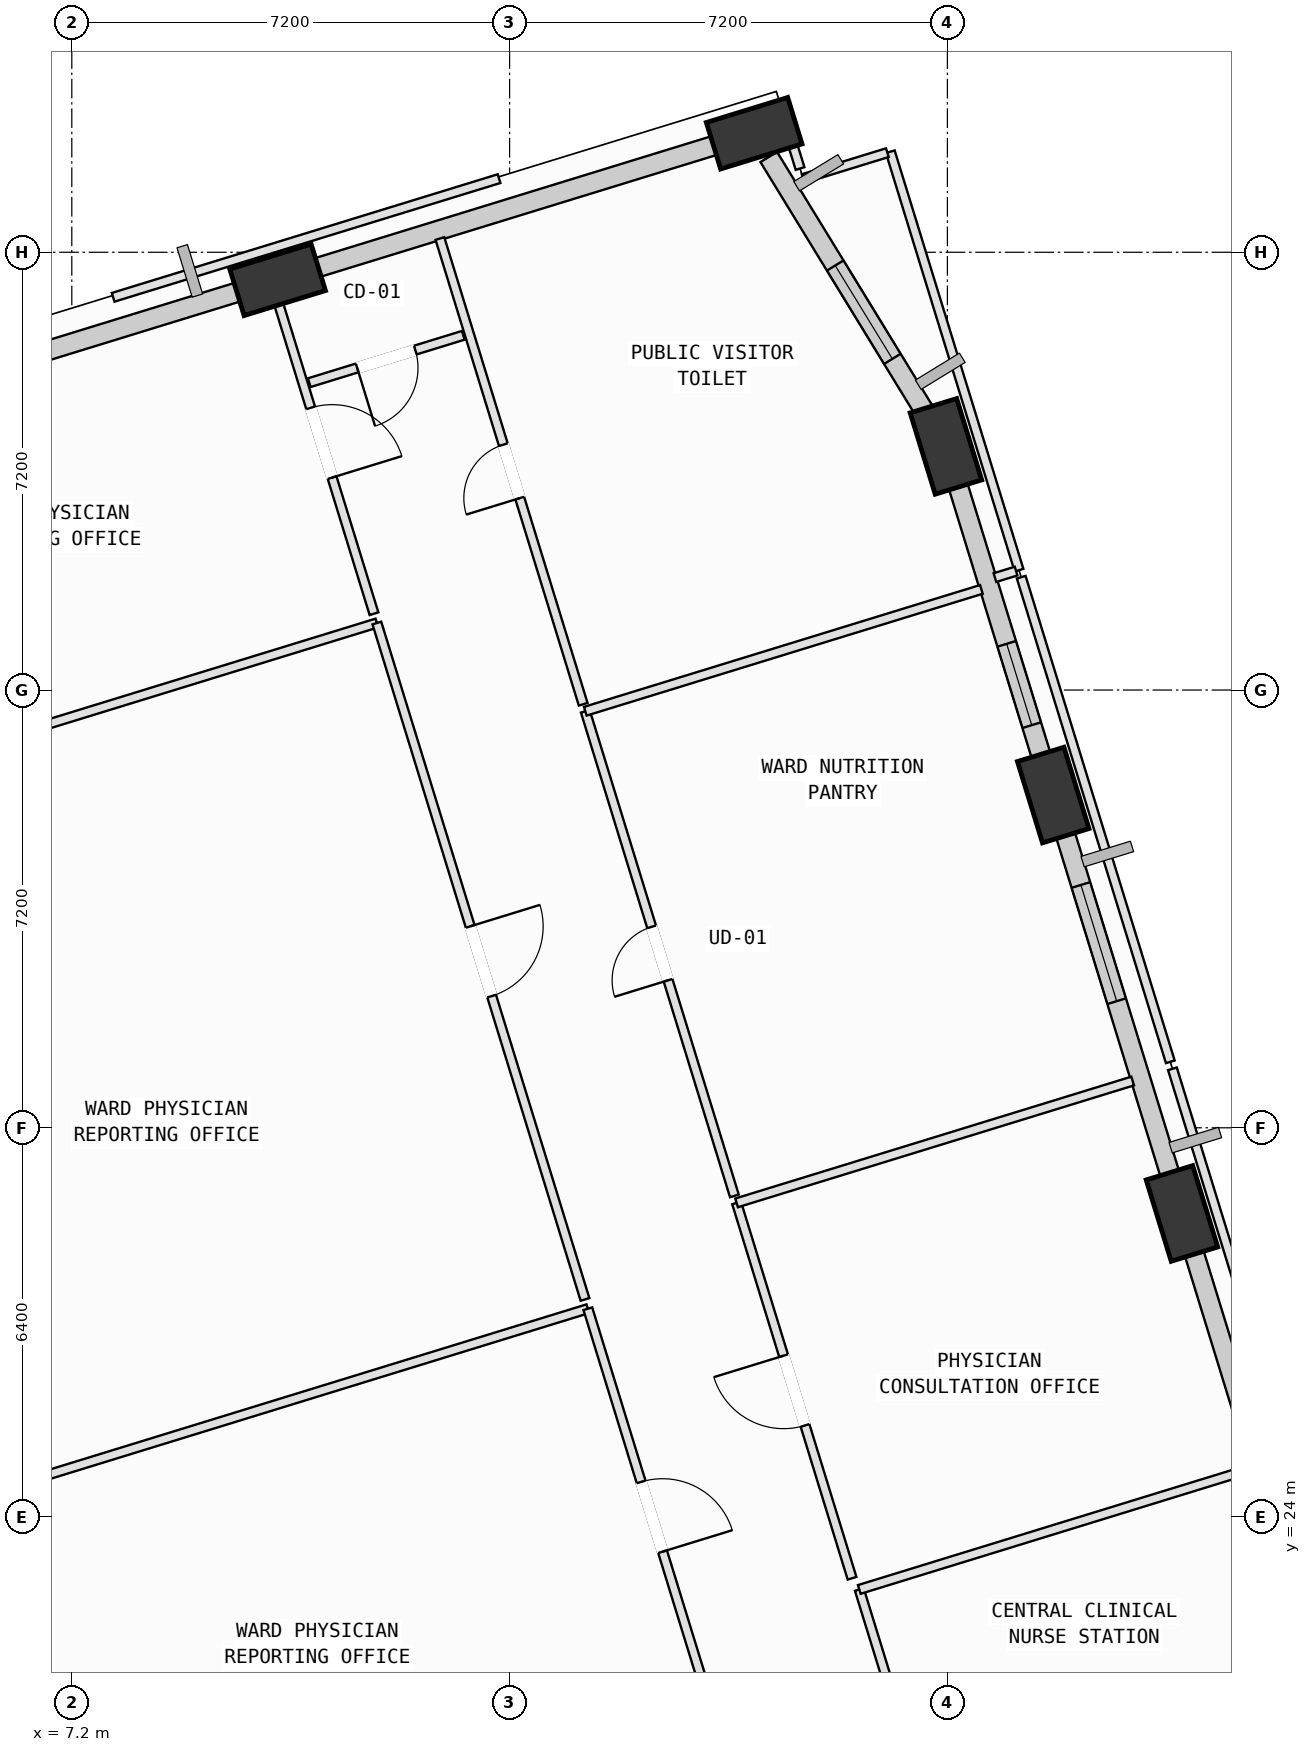
"""IFC4 building model, lengths in metres.
Left out: names, types, materials, properties, quantities, classifications, styles, units other than length and angle.
Written with IfcOpenShell. Run it as: python <this file> out.ifc"""

import sys

from ifc_helpers import new_model, si_unit, direction, frame, frame_2d, origin, origin_2d, place, context, subcontext, project, spatial, rectangle, extrude, element, fill, save


model = new_model("IFC4")
c1 = context("Model", 3, precision=1e-05, world=origin(), true_north=direction((0.0, 1.0)))
c2 = subcontext(c1, "Body", "Model", "MODEL_VIEW")
j1 = project(units=[si_unit("LENGTHUNIT", "METRE"), si_unit("PLANEANGLEUNIT", "RADIAN")], contexts=[c1])
p1 = place(None, origin())
s1 = spatial("IfcSite", under=j1, at=p1, CompositionType="ELEMENT")
p2 = place(p1, origin())
s2 = spatial("IfcBuilding", under=s1, at=p2, CompositionType="ELEMENT")
p3 = place(p2, frame((0.0, 0.0, 96.4)))
s3 = spatial("IfcBuildingStorey", under=s2, at=p3, CompositionType="ELEMENT", Elevation=96.4)
p4 = place(p3, frame((25.458, 28.991, 0.002), z_axis=(-0.017093218306, -0.033820153363, 0.999281751617), x_axis=(0.168398647055, 0.985053333216, 0.036219143978)))
e1 = element("IfcColumn", 1, at=p4, inside=s3, PredefinedType="COLUMN", context=c2, shape_type="SweptSolid", body=[
    extrude(rectangle(XDim=1.4, YDim=0.8, at=origin_2d()), origin(), (0.0, 0.0, 1.0), 3.999),
])
p5 = place(p3, frame((23.341, 35.873, 0.002), z_axis=(-0.045484855121, -0.042863073928, 0.998045031473), x_axis=(0.492578807778, 0.86821525244, 0.059736032321)))
e2 = element("IfcColumn", 2, at=p5, inside=s3, PredefinedType="COLUMN", context=c2, shape_type="SweptSolid", body=[
    extrude(rectangle(XDim=1.4, YDim=0.8, at=origin_2d()), origin(), (0.0, 0.0, 1.0), 4.004),
])
p6 = place(p3, frame((21.576, 41.607, 0.002), z_axis=(-0.068963873913, -0.050216413043, 0.996354503154), x_axis=(0.596759663559, 0.798266514459, 0.081538186404)))
e3 = element("IfcColumn", 3, at=p6, inside=s3, PredefinedType="COLUMN", context=c2, shape_type="SweptSolid", body=[
    extrude(rectangle(XDim=1.4, YDim=0.8, at=origin_2d()), origin(), (0.0, 0.0, 1.0), 4.011),
])
p7 = place(p3, frame((18.422, 46.758, 0.002), z_axis=(-0.089927303645, -0.063270932072, 0.993936551906), x_axis=(0.789011269168, -0.61352743043, 0.032331242417)))
e4 = element("IfcColumn", 4, at=p7, inside=s3, PredefinedType="COLUMN", context=c2, shape_type="SweptSolid", body=[
    extrude(rectangle(XDim=1.4, YDim=0.8, at=origin_2d()), origin(), (0.0, 0.0, 1.0), 4.021),
])
p8 = place(p3, frame((10.585, 44.347, 0.002), z_axis=(-0.079651712369, -0.095351707425, 0.992251811088), x_axis=(0.920581175981, -0.388838882589, 0.036532476201)))
e5 = element("IfcColumn", 5, at=p8, inside=s3, PredefinedType="COLUMN", context=c2, shape_type="SweptSolid", body=[
    extrude(rectangle(XDim=1.4, YDim=0.8, at=origin_2d()), origin(), (0.0, 0.0, 1.0), 4.028),
])
p9 = place(p3, frame((25.619, 28.467, 0.0), z_axis=(0.0, 0.0, 1.0), x_axis=(0.294050319043, -0.955789940244, 0.0)))
e6 = element("IfcWall", 6, at=p9, inside=s3, PredefinedType="SOLIDWALL", context=c2, shape_type="SweptSolid", body=[
    extrude(rectangle(XDim=6.76, YDim=0.32, at=frame_2d((3.38, 0.0))), origin(), (0.0, 0.0, 1.0), 2.965),
])
p10 = place(p3, frame((23.499, 35.358, 0.0), z_axis=(0.0, 0.0, 1.0), x_axis=(0.294025193447, -0.955797669812, 0.0)))
e7 = element("IfcWall", 7, at=p10, inside=s3, PredefinedType="SOLIDWALL", context=c2, shape_type="SweptSolid", body=[
    extrude(rectangle(XDim=6.223, YDim=0.32, at=frame_2d((3.111, 0.0))), origin(), (0.0, 0.0, 1.0), 3.165),
])
p11 = place(p10, frame((1.009, 0.0, 0.75)))
e8 = element("IfcOpeningElement", 8, at=p11, cuts=e7, PredefinedType="OPENING", context=c2, shape_type="SweptSolid", body=[
    extrude(rectangle(XDim=2.0, YDim=1.95, at=frame_2d((1.0, 0.975))), frame((0.0, 0.17, 0.0), z_axis=(0.0, -1.0, 0.0), x_axis=(1.0, 0.0, 0.0)), (0.0, 0.0, 1.0), 0.34),
])
p12 = place(p3, frame((21.731, 41.106, 0.0), z_axis=(0.0, 0.0, 1.0), x_axis=(0.293997472896, -0.955806196847, 0.0)))
e9 = element("IfcWall", 9, at=p12, inside=s3, PredefinedType="SOLIDWALL", context=c2, shape_type="SweptSolid", body=[
    extrude(rectangle(XDim=5.047, YDim=0.32, at=frame_2d((2.524, 0.0))), origin(), (0.0, 0.0, 1.0), 3.165),
])
p13 = place(p12, frame((2.873, 0.0, 0.75)))
e10 = element("IfcOpeningElement", 10, at=p13, cuts=e9, PredefinedType="OPENING", context=c2, shape_type="SweptSolid", body=[
    extrude(rectangle(XDim=1.4, YDim=1.85, at=frame_2d((0.7, 0.925))), frame((0.0, 0.17, 0.0), z_axis=(0.0, -1.0, 0.0), x_axis=(1.0, 0.0, 0.0)), (0.0, 0.0, 1.0), 0.34),
])
p14 = place(p3, frame((18.662, 46.367, 0.0), z_axis=(0.0, 0.0, 1.0), x_axis=(0.522196965962, -0.852824910952, 0.0)))
e11 = element("IfcWall", 11, at=p14, inside=s3, PredefinedType="SOLIDWALL", context=c2, shape_type="SweptSolid", body=[
    extrude(rectangle(XDim=5.128, YDim=0.32, at=frame_2d((2.564, 0.0))), origin(), (0.0, 0.0, 1.0), 3.165),
])
p15 = place(p14, frame((2.093, 0.0, 0.75)))
e12 = element("IfcOpeningElement", 12, at=p15, cuts=e11, PredefinedType="OPENING", context=c2, shape_type="SweptSolid", body=[
    extrude(rectangle(XDim=1.8, YDim=2.05, at=frame_2d((0.9, 1.025))), frame((0.0, 0.17, 0.0), z_axis=(0.0, -1.0, 0.0), x_axis=(1.0, 0.0, 0.0)), (0.0, 0.0, 1.0), 0.34),
])
p16 = place(p3, frame((10.841, 44.425, 0.0), z_axis=(0.0, 0.0, 1.0), x_axis=(0.95578995853, 0.294050259603, 0.0)))
e13 = element("IfcWall", 13, at=p16, inside=s3, PredefinedType="SOLIDWALL", context=c2, shape_type="SweptSolid", body=[
    extrude(rectangle(XDim=7.231, YDim=0.32, at=frame_2d((3.615, 0.0))), origin(), (0.0, 0.0, 1.0), 3.165),
])
p17 = place(p3, frame((2.98, 42.007, 0.0), z_axis=(0.0, 0.0, 1.0), x_axis=(0.955793529239, 0.294038653012, 0.0)))
e14 = element("IfcWall", 14, at=p17, inside=s3, PredefinedType="SOLIDWALL", context=c2, shape_type="SweptSolid", body=[
    extrude(rectangle(XDim=7.27, YDim=0.32, at=frame_2d((3.635, 0.0))), origin(), (0.0, 0.0, 1.0), 3.165),
])
p18 = place(p3, frame((5.206, 24.199, 0.0), z_axis=(0.0, 0.0, 1.0), x_axis=(0.955774194853, 0.294101493455, 0.0)))
e15 = element("IfcWall", 15, at=p18, inside=s3, PredefinedType="PARTITIONING", context=c2, shape_type="SweptSolid", body=[
    extrude(rectangle(XDim=10.966, YDim=0.15, at=frame_2d((5.483, 0.0))), origin(), (0.0, 0.0, 1.0), 3.78),
])
p19 = place(p3, frame((15.687, 27.424, 0.0), z_axis=(0.0, 0.0, 1.0), x_axis=(0.293975633895, -0.955812914056, 0.0)))
e16 = element("IfcWall", 16, at=p19, inside=s3, PredefinedType="PARTITIONING", context=c2, shape_type="SweptSolid", body=[
    extrude(rectangle(XDim=7.16, YDim=0.15, at=frame_2d((3.58, 0.0))), origin(), (0.0, 0.0, 1.0), 3.78),
])
p20 = place(p19, frame((2.98, 0.0, 0.0)))
e17 = element("IfcOpeningElement", 17, at=p20, cuts=e16, PredefinedType="OPENING", context=c2, shape_type="SweptSolid", body=[
    extrude(rectangle(XDim=1.2, YDim=2.15, at=frame_2d((0.6, 1.075))), frame((0.0, 0.085, 0.0), z_axis=(0.0, -1.0, 0.0), x_axis=(1.0, 0.0, 0.0)), (0.0, 0.0, 1.0), 0.17),
])
p21 = place(p3, frame((1.737, 35.478, 0.0), z_axis=(0.0, 0.0, 1.0), x_axis=(0.955797782575, 0.294024826886, 0.0)))
e18 = element("IfcWall", 18, at=p21, inside=s3, PredefinedType="PARTITIONING", context=c2, shape_type="SweptSolid", body=[
    extrude(rectangle(XDim=10.965, YDim=0.15, at=frame_2d((5.482, 0.0))), origin(), (0.0, 0.0, 1.0), 3.78),
])
p22 = place(p3, frame((12.217, 38.702, 0.0), z_axis=(0.0, 0.0, 1.0), x_axis=(0.294068161841, -0.955784450696, 0.0)))
e19 = element("IfcWall", 19, at=p22, inside=s3, PredefinedType="PARTITIONING", context=c2, shape_type="SweptSolid", body=[
    extrude(rectangle(XDim=11.64, YDim=0.15, at=frame_2d((5.82, 0.0))), origin(), (0.0, 0.0, 1.0), 3.78),
])
p23 = place(p22, frame((5.22, 0.0, 0.0)))
e20 = element("IfcOpeningElement", 20, at=p23, cuts=e19, PredefinedType="OPENING", context=c2, shape_type="SweptSolid", body=[
    extrude(rectangle(XDim=1.2, YDim=2.15, at=frame_2d((0.6, 1.075))), frame((0.0, 0.085, 0.0), z_axis=(0.0, -1.0, 0.0), x_axis=(1.0, 0.0, 0.0)), (0.0, 0.0, 1.0), 0.17),
])
p24 = place(p3, frame((9.878, 44.307, 0.0), z_axis=(0.0, 0.0, 1.0), x_axis=(0.955553962092, 0.294816257234, 0.0)))
e21 = element("IfcWall", 21, at=p24, inside=s3, PredefinedType="PARTITIONING", context=c2, shape_type="SweptSolid", body=[
    extrude(rectangle(XDim=0.587, YDim=0.15, at=frame_2d((0.293, 0.0))), origin(), (0.0, 0.0, 1.0), 3.78),
])
p25 = place(p3, frame((10.439, 44.48, 0.0), z_axis=(0.0, 0.0, 1.0), x_axis=(0.294114998969, -0.955770038964, 0.0)))
e22 = element("IfcWall", 22, at=p25, inside=s3, PredefinedType="PARTITIONING", context=c2, shape_type="SweptSolid", body=[
    extrude(rectangle(XDim=5.885, YDim=0.15, at=frame_2d((2.943, 0.0))), origin(), (0.0, 0.0, 1.0), 2.965),
])
p26 = place(p25, frame((2.343, 0.0, 0.0)))
e23 = element("IfcOpeningElement", 23, at=p26, cuts=e22, PredefinedType="OPENING", context=c2, shape_type="SweptSolid", body=[
    extrude(rectangle(XDim=1.2, YDim=2.15, at=frame_2d((0.6, 1.075))), frame((0.0, 0.085, 0.0), z_axis=(0.0, -1.0, 0.0), x_axis=(1.0, 0.0, 0.0)), (0.0, 0.0, 1.0), 0.17),
])
p27 = place(p3, frame((20.837, 20.58, 0.0), z_axis=(0.0, 0.0, 1.0), x_axis=(-0.294424516265, 0.955674737671, 0.0)))
e24 = element("IfcWall", 24, at=p27, inside=s3, PredefinedType="PARTITIONING", context=c2, shape_type="SweptSolid", body=[
    extrude(rectangle(XDim=2.33, YDim=0.15, at=frame_2d((1.165, 0.0))), origin(), (0.0, 0.0, 1.0), 3.78),
])
p28 = place(p3, frame((20.151, 22.807, 0.0), z_axis=(0.0, 0.0, 1.0), x_axis=(0.95576728766, 0.294123939589, 0.0)))
e25 = element("IfcWall", 25, at=p28, inside=s3, PredefinedType="PARTITIONING", context=c2, shape_type="SweptSolid", body=[
    extrude(rectangle(XDim=6.756, YDim=0.15, at=frame_2d((3.378, 0.0))), origin(), (0.0, 0.0, 1.0), 3.78),
])
p29 = place(p3, frame((20.032, 22.991, 0.0), z_axis=(0.0, 0.0, 1.0), x_axis=(-0.293974298693, 0.955813324718, 0.0)))
e26 = element("IfcWall", 26, at=p29, inside=s3, PredefinedType="PARTITIONING", context=c2, shape_type="SweptSolid", body=[
    extrude(rectangle(XDim=6.459, YDim=0.15, at=frame_2d((3.23, 0.0))), origin(), (0.0, 0.0, 1.0), 3.78),
])
p30 = place(p29, frame((2.63, 0.0, 0.0)))
e27 = element("IfcOpeningElement", 27, at=p30, cuts=e26, PredefinedType="OPENING", context=c2, shape_type="SweptSolid", body=[
    extrude(rectangle(XDim=1.2, YDim=2.15, at=frame_2d((0.6, 1.075))), frame((0.0, 0.085, 0.0), z_axis=(0.0, -1.0, 0.0), x_axis=(1.0, 0.0, 0.0)), (0.0, 0.0, 1.0), 0.17),
])
p31 = place(p3, frame((18.133, 29.165, 0.0), z_axis=(0.0, 0.0, 1.0), x_axis=(0.95579449844, 0.294035502537, 0.0)))
e28 = element("IfcWall", 28, at=p31, inside=s3, PredefinedType="PARTITIONING", context=c2, shape_type="SweptSolid", body=[
    extrude(rectangle(XDim=6.815, YDim=0.15, at=frame_2d((3.408, 0.0))), origin(), (0.0, 0.0, 1.0), 3.78),
])
p32 = place(p3, frame((25.301, 31.37, 0.0), z_axis=(0.0, 0.0, 1.0), x_axis=(0.294112406625, -0.955770836691, 0.0)))
e29 = element("IfcWall", 29, at=p32, inside=s3, PredefinedType="PARTITIONING", context=c2, shape_type="SweptSolid", body=[
    extrude(rectangle(XDim=6.46, YDim=0.15, at=frame_2d((3.23, 0.0))), origin(), (0.0, 0.0, 1.0), 3.78),
])
p33 = place(p3, frame((18.097, 29.28, 0.0), z_axis=(0.0, 0.0, 1.0), x_axis=(-0.29400973267, 0.955802425763, 0.0)))
e30 = element("IfcWall", 30, at=p33, inside=s3, PredefinedType="PARTITIONING", context=c2, shape_type="SweptSolid", body=[
    extrude(rectangle(XDim=8.34, YDim=0.15, at=frame_2d((4.17, 0.0))), origin(), (0.0, 0.0, 1.0), 3.78),
])
p34 = place(p33, frame((3.71, 0.0, 0.0)))
e31 = element("IfcOpeningElement", 31, at=p34, cuts=e30, PredefinedType="OPENING", context=c2, shape_type="SweptSolid", body=[
    extrude(rectangle(XDim=0.92, YDim=2.1, at=frame_2d((0.46, 1.05))), frame((0.0, 0.085, 0.0), z_axis=(0.0, -1.0, 0.0), x_axis=(1.0, 0.0, 0.0)), (0.0, 0.0, 1.0), 0.17),
])
p35 = place(p3, frame((15.645, 37.251, 0.0), z_axis=(0.0, 0.0, 1.0), x_axis=(0.95579449844, 0.294035502537, 0.0)))
e32 = element("IfcWall", 32, at=p35, inside=s3, PredefinedType="PARTITIONING", context=c2, shape_type="SweptSolid", body=[
    extrude(rectangle(XDim=6.815, YDim=0.15, at=frame_2d((3.408, 0.0))), origin(), (0.0, 0.0, 1.0), 3.78),
])
p36 = place(p3, frame((22.814, 39.456, 0.0), z_axis=(0.0, 0.0, 1.0), x_axis=(0.294036476826, -0.955794198714, 0.0)))
e33 = element("IfcWall", 33, at=p36, inside=s3, PredefinedType="PARTITIONING", context=c2, shape_type="SweptSolid", body=[
    extrude(rectangle(XDim=8.34, YDim=0.15, at=frame_2d((4.17, 0.0))), origin(), (0.0, 0.0, 1.0), 3.78),
])
p37 = place(p3, frame((20.661, 46.453, 0.0), z_axis=(0.0, 0.0, 1.0), x_axis=(0.294047725332, -0.955790738199, 0.0)))
e34 = element("IfcWall", 34, at=p37, inside=s3, PredefinedType="PARTITIONING", context=c2, shape_type="SweptSolid", body=[
    extrude(rectangle(XDim=7.2, YDim=0.15, at=frame_2d((3.6, 0.0))), origin(), (0.0, 0.0, 1.0), 3.78),
])
p38 = place(p3, frame((22.73, 39.556, 0.0), z_axis=(0.0, 0.0, 1.0), x_axis=(-0.955865987396, -0.293803019284, 0.0)))
e35 = element("IfcWall", 35, at=p38, inside=s3, PredefinedType="PARTITIONING", context=c2, shape_type="SweptSolid", body=[
    extrude(rectangle(XDim=0.364, YDim=0.15, at=frame_2d((0.182, 0.0))), origin(), (0.0, 0.0, 1.0), 3.78),
])
p39 = place(p3, frame((15.61, 37.366, 0.0), z_axis=(0.0, 0.0, 1.0), x_axis=(-0.294006641811, 0.955803376522, 0.0)))
e36 = element("IfcWall", 36, at=p39, inside=s3, PredefinedType="PARTITIONING", context=c2, shape_type="SweptSolid", body=[
    extrude(rectangle(XDim=8.014, YDim=0.15, at=frame_2d((4.007, 0.0))), origin(), (0.0, 0.0, 1.0), 3.78),
])
p40 = place(p39, frame((3.547, 0.0, 0.0)))
e37 = element("IfcOpeningElement", 37, at=p40, cuts=e36, PredefinedType="OPENING", context=c2, shape_type="SweptSolid", body=[
    extrude(rectangle(XDim=0.92, YDim=2.1, at=frame_2d((0.46, 1.05))), frame((0.0, 0.085, 0.0), z_axis=(0.0, -1.0, 0.0), x_axis=(1.0, 0.0, 0.0)), (0.0, 0.0, 1.0), 0.17),
])
p41 = place(p3, frame((17.696, 46.733, 0.0), z_axis=(0.0, 0.0, 1.0), x_axis=(0.955745257155, 0.294195519043, 0.0)))
e38 = element("IfcWall", 38, at=p41, inside=s3, PredefinedType="PARTITIONING", context=c2, shape_type="SweptSolid", body=[
    extrude(rectangle(XDim=1.251, YDim=0.15, at=frame_2d((0.626, 0.0))), origin(), (0.0, 0.0, 1.0), 3.165),
])
p42 = place(p3, frame((18.907, 47.053, 0.0), z_axis=(0.0, 0.0, 1.0), x_axis=(0.294572421732, -0.955629158385, 0.0)))
e39 = element("IfcWall", 39, at=p42, inside=s3, PredefinedType="PARTITIONING", context=c2, shape_type="SweptSolid", body=[
    extrude(rectangle(XDim=0.917, YDim=0.15, at=frame_2d((0.458, 0.0))), origin(), (0.0, 0.0, 1.0), 3.78),
])
p43 = place(p3, frame((19.228, 46.012, 0.0), z_axis=(0.0, 0.0, 1.0), x_axis=(0.955804505271, 0.294002972272, 0.0)))
e40 = element("IfcWall", 40, at=p43, inside=s3, PredefinedType="PARTITIONING", context=c2, shape_type="SweptSolid", body=[
    extrude(rectangle(XDim=1.449, YDim=0.15, at=frame_2d((0.725, 0.0))), origin(), (0.0, 0.0, 1.0), 3.78),
])
p44 = place(p3, frame((13.638, 43.434, 0.0), z_axis=(0.0, 0.0, 1.0), x_axis=(-0.955812865114, -0.29397579302, 0.0)))
e41 = element("IfcWall", 41, at=p44, inside=s3, PredefinedType="PARTITIONING", context=c2, shape_type="SweptSolid", body=[
    extrude(rectangle(XDim=2.65, YDim=0.15, at=frame_2d((1.325, 0.0))), origin(), (0.0, 0.0, 1.0), 3.78),
])
p45 = place(p44, frame((0.825, 0.0, 0.0)))
e42 = element("IfcOpeningElement", 42, at=p45, cuts=e41, PredefinedType="OPENING", context=c2, shape_type="SweptSolid", body=[
    extrude(rectangle(XDim=1.0, YDim=2.12, at=frame_2d((0.5, 1.06))), frame((0.0, 0.085, 0.0), z_axis=(0.0, -1.0, 0.0), x_axis=(1.0, 0.0, 0.0)), (0.0, 0.0, 1.0), 0.17),
])
p46 = place(p3, frame((7.88, 44.059, 0.0), z_axis=(0.0, 0.0, 1.0), x_axis=(0.955824308127, 0.29393858541, 0.0)))
e43 = element("IfcWall", 43, at=p46, inside=s3, PredefinedType="PARTITIONING", context=c2, shape_type="SweptSolid", body=[
    extrude(rectangle(XDim=6.641, YDim=0.15, at=frame_2d((3.32, 0.0))), origin(), (0.0, 0.0, 1.0), 3.78),
])
p47 = place(p11, origin())
e44 = element("IfcWindow", 44, at=p47, inside=s3, PartitioningType="SINGLE_PANEL", PredefinedType="WINDOW", context=c2, shape_type="SweptSolid", body=[
    extrude(rectangle(XDim=2.0, YDim=1.95, at=frame_2d((1.0, 0.975))), frame((0.0, 0.03, 0.0), z_axis=(0.0, -1.0, 0.0), x_axis=(1.0, 0.0, 0.0)), (0.0, 0.0, 1.0), 0.06),
])
fill(e8, e44)
p48 = place(p13, origin())
e45 = element("IfcWindow", 45, at=p48, inside=s3, PartitioningType="SINGLE_PANEL", PredefinedType="WINDOW", context=c2, shape_type="SweptSolid", body=[
    extrude(rectangle(XDim=1.4, YDim=1.85, at=frame_2d((0.7, 0.925))), frame((0.0, 0.03, 0.0), z_axis=(0.0, -1.0, 0.0), x_axis=(1.0, 0.0, 0.0)), (0.0, 0.0, 1.0), 0.06),
])
fill(e10, e45)
p49 = place(p15, origin())
e46 = element("IfcWindow", 46, at=p49, inside=s3, PartitioningType="SINGLE_PANEL", PredefinedType="WINDOW", context=c2, shape_type="SweptSolid", body=[
    extrude(rectangle(XDim=1.8, YDim=2.05, at=frame_2d((0.9, 1.025))), frame((0.0, 0.03, 0.0), z_axis=(0.0, -1.0, 0.0), x_axis=(1.0, 0.0, 0.0)), (0.0, 0.0, 1.0), 0.06),
])
fill(e12, e46)
p50 = place(p20, origin())
e47 = element("IfcDoor", 47, at=p50, inside=s3, OperationType="SINGLE_SWING_RIGHT", PredefinedType="DOOR", context=c2, shape_type="SweptSolid", body=[
    extrude(rectangle(XDim=1.2, YDim=2.15, at=frame_2d((0.6, 1.075))), frame((0.0, 0.025, 0.0), z_axis=(0.0, -1.0, 0.0), x_axis=(1.0, 0.0, 0.0)), (0.0, 0.0, 1.0), 0.05),
])
fill(e17, e47)
p51 = place(p23, origin())
e48 = element("IfcDoor", 48, at=p51, inside=s3, OperationType="SINGLE_SWING_LEFT", PredefinedType="DOOR", context=c2, shape_type="SweptSolid", body=[
    extrude(rectangle(XDim=1.2, YDim=2.15, at=frame_2d((0.6, 1.075))), frame((0.0, 0.025, 0.0), z_axis=(0.0, -1.0, 0.0), x_axis=(1.0, 0.0, 0.0)), (0.0, 0.0, 1.0), 0.05),
])
fill(e20, e48)
p52 = place(p26, origin())
e49 = element("IfcDoor", 49, at=p52, inside=s3, OperationType="SINGLE_SWING_RIGHT", PredefinedType="DOOR", context=c2, shape_type="SweptSolid", body=[
    extrude(rectangle(XDim=1.2, YDim=2.15, at=frame_2d((0.6, 1.075))), frame((0.0, 0.025, 0.0), z_axis=(0.0, -1.0, 0.0), x_axis=(1.0, 0.0, 0.0)), (0.0, 0.0, 1.0), 0.05),
])
fill(e23, e49)
p53 = place(p30, origin())
e50 = element("IfcDoor", 50, at=p53, inside=s3, OperationType="SINGLE_SWING_RIGHT", PredefinedType="DOOR", context=c2, shape_type="SweptSolid", body=[
    extrude(rectangle(XDim=1.2, YDim=2.15, at=frame_2d((0.6, 1.075))), frame((0.0, 0.025, 0.0), z_axis=(0.0, -1.0, 0.0), x_axis=(1.0, 0.0, 0.0)), (0.0, 0.0, 1.0), 0.05),
])
fill(e27, e50)
p54 = place(p34, origin())
e51 = element("IfcDoor", 51, at=p54, inside=s3, OperationType="SINGLE_SWING_LEFT", PredefinedType="DOOR", context=c2, shape_type="SweptSolid", body=[
    extrude(rectangle(XDim=0.92, YDim=2.1, at=frame_2d((0.46, 1.05))), frame((0.0, 0.025, 0.0), z_axis=(0.0, -1.0, 0.0), x_axis=(1.0, 0.0, 0.0)), (0.0, 0.0, 1.0), 0.05),
])
fill(e31, e51)
p55 = place(p40, origin())
e52 = element("IfcDoor", 52, at=p55, inside=s3, OperationType="SINGLE_SWING_LEFT", PredefinedType="DOOR", context=c2, shape_type="SweptSolid", body=[
    extrude(rectangle(XDim=0.92, YDim=2.1, at=frame_2d((0.46, 1.05))), frame((0.0, 0.025, 0.0), z_axis=(0.0, -1.0, 0.0), x_axis=(1.0, 0.0, 0.0)), (0.0, 0.0, 1.0), 0.05),
])
fill(e37, e52)
p56 = place(p45, origin())
e53 = element("IfcDoor", 53, at=p56, inside=s3, OperationType="SINGLE_SWING_RIGHT", PredefinedType="DOOR", context=c2, shape_type="SweptSolid", body=[
    extrude(rectangle(XDim=1.0, YDim=2.12, at=frame_2d((0.5, 1.06))), frame((0.0, 0.025, 0.0), z_axis=(0.0, -1.0, 0.0), x_axis=(1.0, 0.0, 0.0)), (0.0, 0.0, 1.0), 0.05),
])
fill(e42, e53)
save(model, sys.argv[1])
